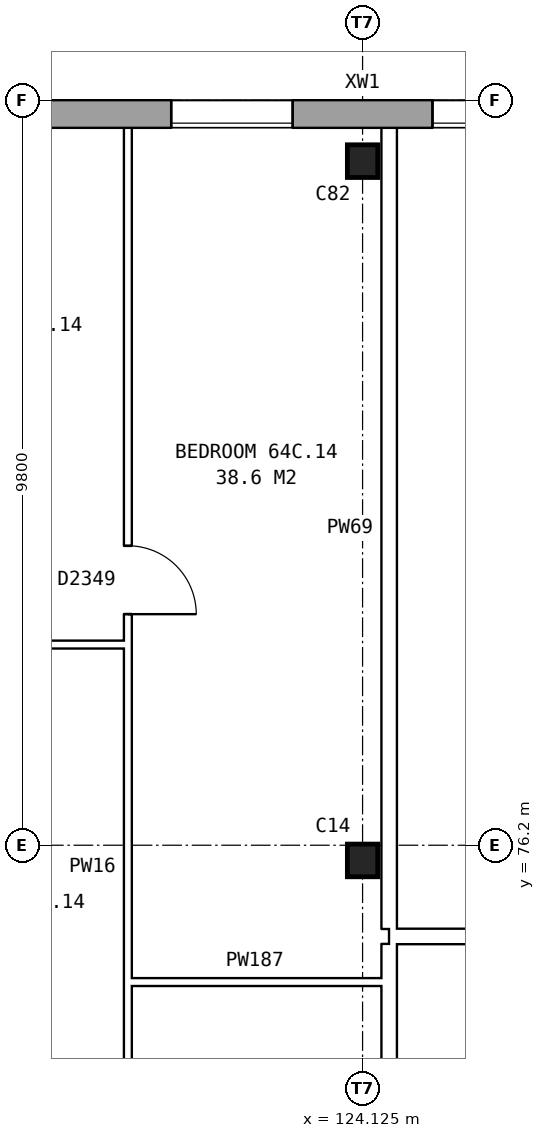
"""IFC4 building model, lengths in metres.
Left out: names, types, materials, properties, quantities, classifications, styles, units other than length and angle.
Written with IfcOpenShell. Run it as: python <this file> out.ifc"""

import sys

from ifc_helpers import new_model, si_unit, direction, frame, frame_2d, origin, origin_2d, place, context, subcontext, project, spatial, rectangle, i_section, extrude, element, fill, save


model = new_model("IFC4")
c1 = context("Model", 3, precision=1e-05, world=origin(), true_north=direction((0.0, 1.0)))
c2 = subcontext(c1, "Body", "Model", "MODEL_VIEW")
j1 = project(units=[si_unit("LENGTHUNIT", "METRE"), si_unit("PLANEANGLEUNIT", "RADIAN")], contexts=[c1])
p1 = place(None, origin())
s1 = spatial("IfcSite", under=j1, at=p1, CompositionType="ELEMENT")
p2 = place(p1, origin())
s2 = spatial("IfcBuilding", under=s1, at=p2, CompositionType="ELEMENT")
p3 = place(p2, frame((0.0, 0.0, 227.6)))
s3 = spatial("IfcBuildingStorey", under=s2, at=p3, CompositionType="ELEMENT", Elevation=227.6)
for number, where, z_axis, x_axis in (
    (1, (124.125, 76.0, 0.0), (0.0, 0.0, 1.0), (1.0, 0.0, 0.0)),
    (2, (124.125, 85.2, 0.0), (0.0, 0.0, 1.0), (1.0, 0.0, 0.0)),
):
    element("IfcColumn", number, at=place(p3, frame(where, z_axis=z_axis, x_axis=x_axis)), inside=s3, PredefinedType="COLUMN", context=c2, shape_type="SweptSolid", body=[
        extrude(i_section(OverallWidth=0.4, OverallDepth=0.43, WebThickness=0.04, FlangeThickness=0.04, at=origin_2d()), origin(), (0.0, 0.0, 1.0), 2.85),
    ])
p4 = place(p3, frame((131.05, 85.82, 0.0), z_axis=(0.0, 0.0, 1.0), x_axis=(-1.0, 0.0, 0.0)))
e3 = element("IfcWall", 3, at=p4, inside=s3, PredefinedType="STANDARD", context=c2, shape_type="SweptSolid", body=[
    extrude(rectangle(XDim=55.1, YDim=0.36, at=frame_2d((27.55, 0.0))), origin(), (0.0, 0.0, 1.0), 2.85),
])
p5 = place(p4, frame((0.969, 0.0, 0.8)))
e4 = element("IfcOpeningElement", 4, at=p5, cuts=e3, PredefinedType="OPENING", context=c2, shape_type="SweptSolid", body=[
    extrude(rectangle(XDim=1.6, YDim=1.8, at=frame_2d((0.8, 0.9))), frame((0.0, 0.19, 0.0), z_axis=(0.0, -1.0, 0.0), x_axis=(1.0, 0.0, 0.0)), (0.0, 0.0, 1.0), 0.38),
])
p6 = place(p4, frame((4.406, 0.0, 0.8)))
e5 = element("IfcOpeningElement", 5, at=p6, cuts=e3, PredefinedType="OPENING", context=c2, shape_type="SweptSolid", body=[
    extrude(rectangle(XDim=1.6, YDim=1.8, at=frame_2d((0.8, 0.9))), frame((0.0, 0.19, 0.0), z_axis=(0.0, -1.0, 0.0), x_axis=(1.0, 0.0, 0.0)), (0.0, 0.0, 1.0), 0.38),
])
p7 = place(p4, frame((7.844, 0.0, 0.8)))
e6 = element("IfcOpeningElement", 6, at=p7, cuts=e3, PredefinedType="OPENING", context=c2, shape_type="SweptSolid", body=[
    extrude(rectangle(XDim=1.6, YDim=1.8, at=frame_2d((0.8, 0.9))), frame((0.0, 0.19, 0.0), z_axis=(0.0, -1.0, 0.0), x_axis=(1.0, 0.0, 0.0)), (0.0, 0.0, 1.0), 0.38),
])
p8 = place(p4, frame((11.281, 0.0, 0.8)))
e7 = element("IfcOpeningElement", 7, at=p8, cuts=e3, PredefinedType="OPENING", context=c2, shape_type="SweptSolid", body=[
    extrude(rectangle(XDim=1.6, YDim=1.8, at=frame_2d((0.8, 0.9))), frame((0.0, 0.19, 0.0), z_axis=(0.0, -1.0, 0.0), x_axis=(1.0, 0.0, 0.0)), (0.0, 0.0, 1.0), 0.38),
])
p9 = place(p4, frame((14.719, 0.0, 0.8)))
e8 = element("IfcOpeningElement", 8, at=p9, cuts=e3, PredefinedType="OPENING", context=c2, shape_type="SweptSolid", body=[
    extrude(rectangle(XDim=1.6, YDim=1.8, at=frame_2d((0.8, 0.9))), frame((0.0, 0.19, 0.0), z_axis=(0.0, -1.0, 0.0), x_axis=(1.0, 0.0, 0.0)), (0.0, 0.0, 1.0), 0.38),
])
p10 = place(p4, frame((18.156, 0.0, 0.8)))
e9 = element("IfcOpeningElement", 9, at=p10, cuts=e3, PredefinedType="OPENING", context=c2, shape_type="SweptSolid", body=[
    extrude(rectangle(XDim=1.6, YDim=1.8, at=frame_2d((0.8, 0.9))), frame((0.0, 0.19, 0.0), z_axis=(0.0, -1.0, 0.0), x_axis=(1.0, 0.0, 0.0)), (0.0, 0.0, 1.0), 0.38),
])
p11 = place(p4, frame((21.594, 0.0, 0.8)))
e10 = element("IfcOpeningElement", 10, at=p11, cuts=e3, PredefinedType="OPENING", context=c2, shape_type="SweptSolid", body=[
    extrude(rectangle(XDim=1.6, YDim=1.8, at=frame_2d((0.8, 0.9))), frame((0.0, 0.19, 0.0), z_axis=(0.0, -1.0, 0.0), x_axis=(1.0, 0.0, 0.0)), (0.0, 0.0, 1.0), 0.38),
])
p12 = place(p4, frame((25.031, 0.0, 0.8)))
e11 = element("IfcOpeningElement", 11, at=p12, cuts=e3, PredefinedType="OPENING", context=c2, shape_type="SweptSolid", body=[
    extrude(rectangle(XDim=1.6, YDim=1.8, at=frame_2d((0.8, 0.9))), frame((0.0, 0.19, 0.0), z_axis=(0.0, -1.0, 0.0), x_axis=(1.0, 0.0, 0.0)), (0.0, 0.0, 1.0), 0.38),
])
p13 = place(p4, frame((28.469, 0.0, 0.8)))
e12 = element("IfcOpeningElement", 12, at=p13, cuts=e3, PredefinedType="OPENING", context=c2, shape_type="SweptSolid", body=[
    extrude(rectangle(XDim=1.6, YDim=1.8, at=frame_2d((0.8, 0.9))), frame((0.0, 0.19, 0.0), z_axis=(0.0, -1.0, 0.0), x_axis=(1.0, 0.0, 0.0)), (0.0, 0.0, 1.0), 0.38),
])
p14 = place(p4, frame((31.906, 0.0, 0.8)))
e13 = element("IfcOpeningElement", 13, at=p14, cuts=e3, PredefinedType="OPENING", context=c2, shape_type="SweptSolid", body=[
    extrude(rectangle(XDim=1.6, YDim=1.8, at=frame_2d((0.8, 0.9))), frame((0.0, 0.19, 0.0), z_axis=(0.0, -1.0, 0.0), x_axis=(1.0, 0.0, 0.0)), (0.0, 0.0, 1.0), 0.38),
])
p15 = place(p4, frame((35.344, 0.0, 0.8)))
e14 = element("IfcOpeningElement", 14, at=p15, cuts=e3, PredefinedType="OPENING", context=c2, shape_type="SweptSolid", body=[
    extrude(rectangle(XDim=1.6, YDim=1.8, at=frame_2d((0.8, 0.9))), frame((0.0, 0.19, 0.0), z_axis=(0.0, -1.0, 0.0), x_axis=(1.0, 0.0, 0.0)), (0.0, 0.0, 1.0), 0.38),
])
p16 = place(p4, frame((38.781, 0.0, 0.8)))
e15 = element("IfcOpeningElement", 15, at=p16, cuts=e3, PredefinedType="OPENING", context=c2, shape_type="SweptSolid", body=[
    extrude(rectangle(XDim=1.6, YDim=1.8, at=frame_2d((0.8, 0.9))), frame((0.0, 0.19, 0.0), z_axis=(0.0, -1.0, 0.0), x_axis=(1.0, 0.0, 0.0)), (0.0, 0.0, 1.0), 0.38),
])
p17 = place(p4, frame((42.219, 0.0, 0.8)))
e16 = element("IfcOpeningElement", 16, at=p17, cuts=e3, PredefinedType="OPENING", context=c2, shape_type="SweptSolid", body=[
    extrude(rectangle(XDim=1.6, YDim=1.8, at=frame_2d((0.8, 0.9))), frame((0.0, 0.19, 0.0), z_axis=(0.0, -1.0, 0.0), x_axis=(1.0, 0.0, 0.0)), (0.0, 0.0, 1.0), 0.38),
])
p18 = place(p4, frame((45.656, 0.0, 0.8)))
e17 = element("IfcOpeningElement", 17, at=p18, cuts=e3, PredefinedType="OPENING", context=c2, shape_type="SweptSolid", body=[
    extrude(rectangle(XDim=1.6, YDim=1.8, at=frame_2d((0.8, 0.9))), frame((0.0, 0.19, 0.0), z_axis=(0.0, -1.0, 0.0), x_axis=(1.0, 0.0, 0.0)), (0.0, 0.0, 1.0), 0.38),
])
p19 = place(p4, frame((49.094, 0.0, 0.8)))
e18 = element("IfcOpeningElement", 18, at=p19, cuts=e3, PredefinedType="OPENING", context=c2, shape_type="SweptSolid", body=[
    extrude(rectangle(XDim=1.6, YDim=1.8, at=frame_2d((0.8, 0.9))), frame((0.0, 0.19, 0.0), z_axis=(0.0, -1.0, 0.0), x_axis=(1.0, 0.0, 0.0)), (0.0, 0.0, 1.0), 0.38),
])
p20 = place(p4, frame((52.531, 0.0, 0.8)))
e19 = element("IfcOpeningElement", 19, at=p20, cuts=e3, PredefinedType="OPENING", context=c2, shape_type="SweptSolid", body=[
    extrude(rectangle(XDim=1.6, YDim=1.8, at=frame_2d((0.8, 0.9))), frame((0.0, 0.19, 0.0), z_axis=(0.0, -1.0, 0.0), x_axis=(1.0, 0.0, 0.0)), (0.0, 0.0, 1.0), 0.38),
])
p21 = place(p3, frame((121.037, 74.4, 0.0), z_axis=(0.0, 0.0, 1.0), x_axis=(1.0, 0.0, 0.0)))
e20 = element("IfcWall", 20, at=p21, inside=s3, PredefinedType="PARTITIONING", context=c2, shape_type="SweptSolid", body=[
    extrude(rectangle(XDim=3.338, YDim=0.1, at=frame_2d((1.669, 0.0))), origin(), (0.0, 0.0, 1.0), 2.85),
])
p22 = place(p3, frame((124.475, 75.0, 0.0), z_axis=(0.0, 0.0, 1.0), x_axis=(1.0, 0.0, 0.0)))
e21 = element("IfcWall", 21, at=p22, inside=s3, PredefinedType="PARTITIONING", context=c2, shape_type="SweptSolid", body=[
    extrude(rectangle(XDim=6.885, YDim=0.2, at=frame_2d((3.442, 0.0))), origin(), (0.0, 0.0, 1.0), 2.85),
])
p23 = place(p22, frame((2.992, 0.0, 0.0)))
e22 = element("IfcOpeningElement", 22, at=p23, cuts=e21, PredefinedType="OPENING", context=c2, shape_type="SweptSolid", body=[
    extrude(rectangle(XDim=0.9, YDim=2.1, at=frame_2d((0.45, 1.05))), frame((0.0, 0.11, 0.0), z_axis=(0.0, -1.0, 0.0), x_axis=(1.0, 0.0, 0.0)), (0.0, 0.0, 1.0), 0.22),
])
p24 = place(p3, frame((117.7, 78.84, 0.0), z_axis=(0.0, 0.0, 1.0), x_axis=(1.0, 0.0, 0.0)))
e23 = element("IfcWall", 23, at=p24, inside=s3, PredefinedType="PARTITIONING", context=c2, shape_type="SweptSolid", body=[
    extrude(rectangle(XDim=3.337, YDim=0.1, at=frame_2d((1.668, 0.0))), origin(), (0.0, 0.0, 1.0), 2.85),
])
p25 = place(p24, frame((1.219, 0.0, 0.0)))
e24 = element("IfcOpeningElement", 24, at=p25, cuts=e23, PredefinedType="OPENING", context=c2, shape_type="SweptSolid", body=[
    extrude(rectangle(XDim=0.9, YDim=2.1, at=frame_2d((0.45, 1.05))), frame((0.0, 0.06, 0.0), z_axis=(0.0, -1.0, 0.0), x_axis=(1.0, 0.0, 0.0)), (0.0, 0.0, 1.0), 0.12),
])
p26 = place(p3, frame((121.037, 71.3, 0.0), z_axis=(0.0, 0.0, 1.0), x_axis=(0.0, 1.0, 0.0)))
e25 = element("IfcWall", 25, at=p26, inside=s3, PredefinedType="PARTITIONING", context=c2, shape_type="SweptSolid", body=[
    extrude(rectangle(XDim=14.34, YDim=0.1, at=frame_2d((7.17, 0.0))), origin(), (0.0, 0.0, 1.0), 2.85),
])
p27 = place(p26, frame((7.94, 0.0, 0.0)))
e26 = element("IfcOpeningElement", 26, at=p27, cuts=e25, PredefinedType="OPENING", context=c2, shape_type="SweptSolid", body=[
    extrude(rectangle(XDim=0.9, YDim=2.1, at=frame_2d((0.45, 1.05))), frame((0.0, 0.06, 0.0), z_axis=(0.0, -1.0, 0.0), x_axis=(1.0, 0.0, 0.0)), (0.0, 0.0, 1.0), 0.12),
])
p28 = place(p26, frame((0.4, 0.0, 0.0)))
e27 = element("IfcOpeningElement", 27, at=p28, cuts=e25, PredefinedType="OPENING", context=c2, shape_type="SweptSolid", body=[
    extrude(rectangle(XDim=0.9, YDim=2.1, at=frame_2d((0.45, 1.05))), frame((0.0, 0.06, 0.0), z_axis=(0.0, -1.0, 0.0), x_axis=(1.0, 0.0, 0.0)), (0.0, 0.0, 1.0), 0.12),
])
p29 = place(p3, frame((124.475, 71.3, 0.0), z_axis=(0.0, 0.0, 1.0), x_axis=(0.0, 1.0, 0.0)))
e28 = element("IfcWall", 28, at=p29, inside=s3, PredefinedType="PARTITIONING", context=c2, shape_type="SweptSolid", body=[
    extrude(rectangle(XDim=3.6, YDim=0.2, at=frame_2d((1.8, 0.0))), origin(), (0.0, 0.0, 1.0), 2.85),
])
p30 = place(p3, frame((124.475, 75.1, 0.0), z_axis=(0.0, 0.0, 1.0), x_axis=(0.0, 1.0, 0.0)))
e29 = element("IfcWall", 29, at=p30, inside=s3, PredefinedType="PARTITIONING", context=c2, shape_type="SweptSolid", body=[
    extrude(rectangle(XDim=10.54, YDim=0.2, at=frame_2d((5.27, 0.0))), origin(), (0.0, 0.0, 1.0), 2.85),
])
p31 = place(p6, origin())
e30 = element("IfcWindow", 30, at=p31, inside=s3, PartitioningType="SINGLE_PANEL", PredefinedType="WINDOW", context=c2, shape_type="SweptSolid", body=[
    extrude(rectangle(XDim=1.6, YDim=1.8, at=frame_2d((0.8, 0.9))), frame((0.0, 0.15, 0.0), z_axis=(0.0, -1.0, 0.0), x_axis=(1.0, 0.0, 0.0)), (0.0, 0.0, 1.0), 0.06),
])
fill(e5, e30)
p32 = place(p7, origin())
e31 = element("IfcWindow", 31, at=p32, inside=s3, PartitioningType="SINGLE_PANEL", PredefinedType="WINDOW", context=c2, shape_type="SweptSolid", body=[
    extrude(rectangle(XDim=1.6, YDim=1.8, at=frame_2d((0.8, 0.9))), frame((0.0, 0.15, 0.0), z_axis=(0.0, -1.0, 0.0), x_axis=(1.0, 0.0, 0.0)), (0.0, 0.0, 1.0), 0.06),
])
fill(e6, e31)
p33 = place(p27, frame((0.9, 0.0, 0.0), z_axis=(0.0, 0.0, 1.0), x_axis=(-1.0, 0.0, 0.0)))
e32 = element("IfcDoor", 32, at=p33, inside=s3, OperationType="SINGLE_SWING_RIGHT", PredefinedType="DOOR", context=c2, shape_type="SweptSolid", body=[
    extrude(rectangle(XDim=0.9, YDim=2.1, at=frame_2d((0.45, 1.05))), frame((0.0, 0.025, 0.0), z_axis=(0.0, -1.0, 0.0), x_axis=(1.0, 0.0, 0.0)), (0.0, 0.0, 1.0), 0.05),
])
fill(e26, e32)
save(model, sys.argv[1])
